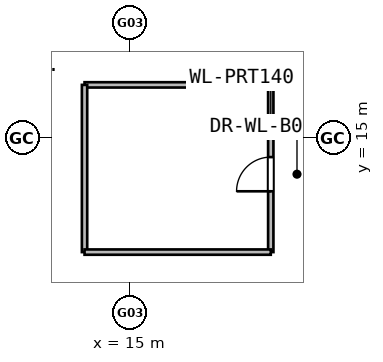
"""IFC4 building model, lengths in metres.
Left out: names, types, materials, properties, quantities, classifications, styles, units other than length and angle.
Written with IfcOpenShell. Run it as: python <this file> out.ifc"""

import sys

from ifc_helpers import new_model, si_unit, direction, frame, frame_2d, origin, place, context, subcontext, project, spatial, rectangle, extrude, element, fill, save


model = new_model("IFC4")
c1 = context("Model", 3, precision=1e-05, world=origin(), true_north=direction((0.0, 1.0)))
c2 = subcontext(c1, "Body", "Model", "MODEL_VIEW")
j1 = project(units=[si_unit("LENGTHUNIT", "METRE"), si_unit("PLANEANGLEUNIT", "RADIAN")], contexts=[c1])
p1 = place(None, origin())
s1 = spatial("IfcSite", under=j1, at=p1, CompositionType="ELEMENT")
p2 = place(p1, origin())
s2 = spatial("IfcBuilding", under=s1, at=p2, CompositionType="ELEMENT")
p3 = place(p2, frame((0.0, 0.0, -5.4)))
s3 = spatial("IfcBuildingStorey", under=s2, at=p3, CompositionType="ELEMENT", Elevation=-5.4)
p4 = place(p3, frame((18.7, 12.0, 0.0), z_axis=(0.0, 0.0, 1.0), x_axis=(0.0, 1.0, 0.0)))
e1 = element("IfcWall", 1, at=p4, inside=s3, PredefinedType="PARTITIONING", context=c2, shape_type="SweptSolid", body=[
    extrude(rectangle(XDim=4.4, YDim=0.14, at=frame_2d((2.2, 0.0))), origin(), (0.0, 0.0, 1.0), 5.08),
])
p5 = place(p4, frame((1.6, 0.0, 0.0)))
e2 = element("IfcOpeningElement", 2, at=p5, cuts=e1, PredefinedType="OPENING", context=c2, shape_type="SweptSolid", body=[
    extrude(rectangle(XDim=0.9, YDim=2.05, at=frame_2d((0.45, 1.025))), frame((0.0, 0.08, 0.0), z_axis=(0.0, -1.0, 0.0), x_axis=(1.0, 0.0, 0.0)), (0.0, 0.0, 1.0), 0.16),
])
p6 = place(p3, frame((13.8, 16.4, 0.0), z_axis=(0.0, 0.0, 1.0), x_axis=(1.0, 0.0, 0.0)))
e3 = element("IfcWall", 3, at=p6, inside=s3, PredefinedType="PARTITIONING", context=c2, shape_type="SweptSolid", body=[
    extrude(rectangle(XDim=4.9, YDim=0.14, at=frame_2d((2.45, 0.0))), origin(), (0.0, 0.0, 1.0), 5.08),
])
p7 = place(p3, frame((13.8, 12.0, 0.0), z_axis=(0.0, 0.0, 1.0), x_axis=(0.0, 1.0, 0.0)))
e4 = element("IfcWall", 4, at=p7, inside=s3, PredefinedType="PARTITIONING", context=c2, shape_type="SweptSolid", body=[
    extrude(rectangle(XDim=4.4, YDim=0.14, at=frame_2d((2.2, 0.0))), origin(), (0.0, 0.0, 1.0), 5.08),
])
p8 = place(p3, frame((13.8, 12.0, 0.0), z_axis=(0.0, 0.0, 1.0), x_axis=(1.0, 0.0, 0.0)))
e5 = element("IfcWall", 5, at=p8, inside=s3, PredefinedType="PARTITIONING", context=c2, shape_type="SweptSolid", body=[
    extrude(rectangle(XDim=4.9, YDim=0.14, at=frame_2d((2.45, 0.0))), origin(), (0.0, 0.0, 1.0), 5.08),
])
p9 = place(p5, origin())
e6 = element("IfcDoor", 6, at=p9, inside=s3, OperationType="SINGLE_SWING_LEFT", PredefinedType="DOOR", context=c2, shape_type="SweptSolid", body=[
    extrude(rectangle(XDim=0.9, YDim=2.05, at=frame_2d((0.45, 1.025))), frame((0.0, 0.025, 0.0), z_axis=(0.0, -1.0, 0.0), x_axis=(1.0, 0.0, 0.0)), (0.0, 0.0, 1.0), 0.05),
])
fill(e2, e6)
save(model, sys.argv[1])
